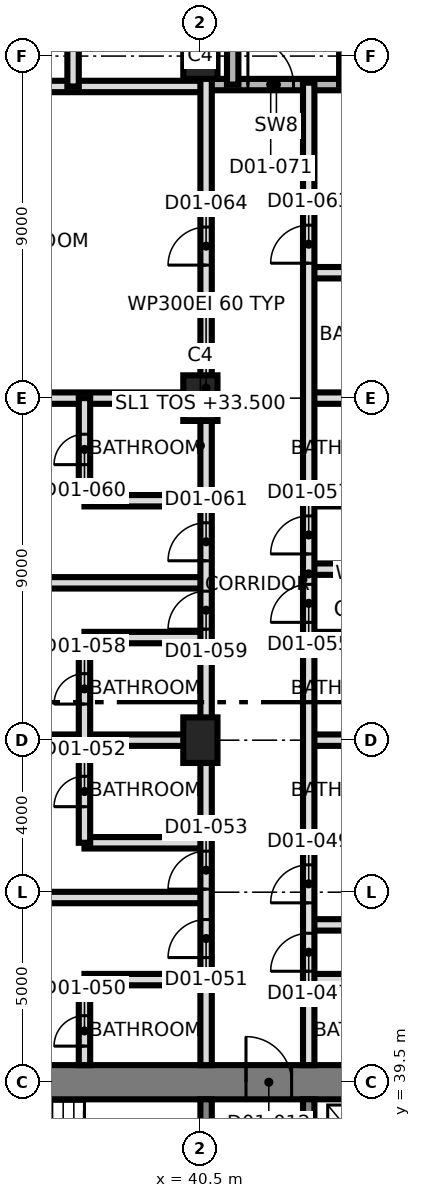
"""IFC4 building model, lengths in metres.
Left out: names, types, materials, properties, quantities, classifications, styles, units other than length and angle.
Written with IfcOpenShell. Run it as: python <this file> out.ifc"""

import sys

from ifc_helpers import new_model, si_unit, direction, frame, frame_2d, origin, origin_2d, place, context, subcontext, project, spatial, rectangle, extrude, element, fill, save


model = new_model("IFC4")
c1 = context("Model", 3, precision=1e-05, world=origin(), true_north=direction((0.0, 1.0)))
c2 = subcontext(c1, "Body", "Model", "MODEL_VIEW")
j1 = project(units=[si_unit("LENGTHUNIT", "METRE"), si_unit("PLANEANGLEUNIT", "RADIAN")], contexts=[c1])
p1 = place(None, origin())
s1 = spatial("IfcSite", under=j1, at=p1, CompositionType="ELEMENT")
p2 = place(p1, origin())
s2 = spatial("IfcBuilding", under=s1, at=p2, CompositionType="ELEMENT")
p3 = place(p2, frame((0.0, 0.0, 33.5)))
s3 = spatial("IfcBuildingStorey", under=s2, at=p3, CompositionType="ELEMENT", Elevation=33.5)
p4 = place(p3, frame((31.05, 39.5, 0.0), z_axis=(0.0, 0.0, 1.0), x_axis=(1.0, 0.0, 0.0)))
e1 = element("IfcWall", 1, at=p4, inside=s3, PredefinedType="SHEAR", context=c2, shape_type="SweptSolid", body=[
    extrude(rectangle(XDim=27.0, YDim=0.9, at=frame_2d((13.5, 0.0))), origin(), (0.0, 0.0, 1.0), 3.7),
])
p5 = place(p4, frame((10.65, 0.0, 0.0)))
e2 = element("IfcOpeningElement", 2, at=p5, cuts=e1, PredefinedType="OPENING", context=c2, shape_type="SweptSolid", body=[
    extrude(rectangle(XDim=1.2, YDim=2.1, at=frame_2d((0.6, 1.05))), frame((0.0, 0.46, 0.0), z_axis=(0.0, -1.0, 0.0), x_axis=(1.0, 0.0, 0.0)), (0.0, 0.0, 1.0), 0.92),
])
for number, where, z_axis, x_axis in (
    (3, (40.65, 33.5, 0.0), (0.0, 0.0, 1.0), (0.0, 1.0, 0.0)),
    (4, (43.35, 33.5, 0.0), (0.0, 0.0, 1.0), (0.0, 1.0, 0.0)),
):
    element("IfcWall", number, at=place(p3, frame(where, z_axis=z_axis, x_axis=x_axis)), inside=s3, PredefinedType="SHEAR", context=c2, shape_type="SweptSolid", body=[
        extrude(rectangle(XDim=5.55, YDim=0.3, at=frame_2d((2.775, 0.0))), origin(), (0.0, 0.0, 1.0), 3.7),
    ])
for number, where, z_axis, x_axis in (
    (5, (40.5, 48.5, 0.0), (0.0, 0.0, 1.0), (0.0, 1.0, 0.0)),
    (6, (40.5, 57.5, 0.0), (0.0, 0.0, 1.0), (0.0, 1.0, 0.0)),
    (7, (40.5, 66.5, 0.0), (0.0, 0.0, 1.0), (0.0, 1.0, 0.0)),
):
    element("IfcColumn", number, at=place(p3, frame(where, z_axis=z_axis, x_axis=x_axis)), inside=s3, PredefinedType="COLUMN", context=c2, shape_type="SweptSolid", body=[
        extrude(rectangle(XDim=1.2, YDim=0.9, at=origin_2d()), origin(), (0.0, 0.0, 1.0), 3.7),
    ])
for number, where, z_axis, x_axis in (
    (8, (37.45, 42.2, 0.0), (0.0, 0.0, 1.0), (1.0, 0.0, 0.0)),
    (9, (43.35, 42.2, 0.0), (0.0, 0.0, 1.0), (1.0, 0.0, 0.0)),
):
    element("IfcWall", number, at=place(p3, frame(where, z_axis=z_axis, x_axis=x_axis)), inside=s3, PredefinedType="PARTITIONING", context=c2, shape_type="SweptSolid", body=[
        extrude(rectangle(XDim=3.2, YDim=0.3, at=frame_2d((1.6, 0.0))), origin(), (0.0, 0.0, 1.0), 3.4),
    ])
p6 = place(p3, frame((43.35, 43.64, 0.0), z_axis=(0.0, 0.0, 1.0), x_axis=(1.0, 0.0, 0.0)))
e10 = element("IfcWall", 10, at=p6, inside=s3, PredefinedType="PARTITIONING", context=c2, shape_type="SweptSolid", body=[
    extrude(rectangle(XDim=6.796, YDim=0.3, at=frame_2d((3.398, 0.0))), origin(), (0.0, 0.0, 1.0), 3.4),
])
p7 = place(p3, frame((31.425, 44.36, 0.0), z_axis=(0.0, 0.0, 1.0), x_axis=(1.0, 0.0, 0.0)))
e11 = element("IfcWall", 11, at=p7, inside=s3, PredefinedType="PARTITIONING", context=c2, shape_type="SweptSolid", body=[
    extrude(rectangle(XDim=9.225, YDim=0.3, at=frame_2d((4.612, 0.0))), origin(), (0.0, 0.0, 1.0), 3.4),
])
for number, where, z_axis, x_axis in (
    (12, (37.45, 45.8, 0.0), (0.0, 0.0, 1.0), (1.0, 0.0, 0.0)),
    (13, (43.35, 45.8, 0.0), (0.0, 0.0, 1.0), (1.0, 0.0, 0.0)),
):
    element("IfcWall", number, at=place(p3, frame(where, z_axis=z_axis, x_axis=x_axis)), inside=s3, PredefinedType="PARTITIONING", context=c2, shape_type="SweptSolid", body=[
        extrude(rectangle(XDim=3.2, YDim=0.3, at=frame_2d((1.6, 0.0))), origin(), (0.0, 0.0, 1.0), 3.4),
    ])
p8 = place(p3, frame((31.425, 48.5, 0.0), z_axis=(0.0, 0.0, 1.0), x_axis=(1.0, 0.0, 0.0)))
e14 = element("IfcWall", 14, at=p8, inside=s3, PredefinedType="PARTITIONING", context=c2, shape_type="SweptSolid", body=[
    extrude(rectangle(XDim=9.225, YDim=0.3, at=frame_2d((4.612, 0.0))), origin(), (0.0, 0.0, 1.0), 3.4),
])
p9 = place(p3, frame((43.35, 48.5, 0.0), z_axis=(0.0, 0.0, 1.0), x_axis=(1.0, 0.0, 0.0)))
e15 = element("IfcWall", 15, at=p9, inside=s3, PredefinedType="PARTITIONING", context=c2, shape_type="SweptSolid", body=[
    extrude(rectangle(XDim=6.225, YDim=0.3, at=frame_2d((3.112, 0.0))), origin(), (0.0, 0.0, 1.0), 3.4),
])
for number, where, z_axis, x_axis in (
    (16, (37.45, 51.2, 0.0), (0.0, 0.0, 1.0), (1.0, 0.0, 0.0)),
    (17, (43.35, 51.2, 0.0), (0.0, 0.0, 1.0), (1.0, 0.0, 0.0)),
):
    element("IfcWall", number, at=place(p3, frame(where, z_axis=z_axis, x_axis=x_axis)), inside=s3, PredefinedType="PARTITIONING", context=c2, shape_type="SweptSolid", body=[
        extrude(rectangle(XDim=3.2, YDim=0.3, at=frame_2d((1.6, 0.0))), origin(), (0.0, 0.0, 1.0), 3.4),
    ])
p10 = place(p3, frame((31.425, 52.64, 0.0), z_axis=(0.0, 0.0, 1.0), x_axis=(1.0, 0.0, 0.0)))
e18 = element("IfcWall", 18, at=p10, inside=s3, PredefinedType="PARTITIONING", context=c2, shape_type="SweptSolid", body=[
    extrude(rectangle(XDim=9.225, YDim=0.3, at=frame_2d((4.612, 0.0))), origin(), (0.0, 0.0, 1.0), 3.4),
])
p11 = place(p3, frame((43.35, 53.0, 0.0), z_axis=(0.0, 0.0, 1.0), x_axis=(1.0, 0.0, 0.0)))
e19 = element("IfcWall", 19, at=p11, inside=s3, PredefinedType="PARTITIONING", context=c2, shape_type="SweptSolid", body=[
    extrude(rectangle(XDim=6.405, YDim=0.3, at=frame_2d((3.202, 0.0))), origin(), (0.0, 0.0, 1.0), 3.4),
])
for number, where, z_axis, x_axis in (
    (20, (37.45, 54.8, 0.0), (0.0, 0.0, 1.0), (1.0, 0.0, 0.0)),
    (21, (43.35, 54.8, 0.0), (0.0, 0.0, 1.0), (1.0, 0.0, 0.0)),
):
    element("IfcWall", number, at=place(p3, frame(where, z_axis=z_axis, x_axis=x_axis)), inside=s3, PredefinedType="PARTITIONING", context=c2, shape_type="SweptSolid", body=[
        extrude(rectangle(XDim=3.2, YDim=0.3, at=frame_2d((1.6, 0.0))), origin(), (0.0, 0.0, 1.0), 3.4),
    ])
p12 = place(p3, frame((31.425, 57.5, 0.0), z_axis=(0.0, 0.0, 1.0), x_axis=(1.0, 0.0, 0.0)))
e22 = element("IfcWall", 22, at=p12, inside=s3, PredefinedType="PARTITIONING", context=c2, shape_type="SweptSolid", body=[
    extrude(rectangle(XDim=9.225, YDim=0.3, at=frame_2d((4.612, 0.0))), origin(), (0.0, 0.0, 1.0), 3.4),
])
p13 = place(p3, frame((43.35, 57.5, 0.0), z_axis=(0.0, 0.0, 1.0), x_axis=(1.0, 0.0, 0.0)))
e23 = element("IfcWall", 23, at=p13, inside=s3, PredefinedType="PARTITIONING", context=c2, shape_type="SweptSolid", body=[
    extrude(rectangle(XDim=6.225, YDim=0.3, at=frame_2d((3.112, 0.0))), origin(), (0.0, 0.0, 1.0), 3.4),
])
p14 = place(p3, frame((43.35, 60.8, 0.0), z_axis=(0.0, 0.0, 1.0), x_axis=(1.0, 0.0, 0.0)))
e24 = element("IfcWall", 24, at=p14, inside=s3, PredefinedType="PARTITIONING", context=c2, shape_type="SweptSolid", body=[
    extrude(rectangle(XDim=3.5, YDim=0.3, at=frame_2d((1.75, 0.0))), origin(), (0.0, 0.0, 1.0), 3.4),
])
p15 = place(p3, frame((31.425, 65.7, 0.0), z_axis=(0.0, 0.0, 1.0), x_axis=(1.0, 0.0, 0.0)))
e25 = element("IfcWall", 25, at=p15, inside=s3, PredefinedType="PARTITIONING", context=c2, shape_type="SweptSolid", body=[
    extrude(rectangle(XDim=9.225, YDim=0.3, at=frame_2d((4.612, 0.0))), origin(), (0.0, 0.0, 1.0), 3.4),
])
p16 = place(p15, frame((3.575, 0.0, 0.0)))
e26 = element("IfcOpeningElement", 26, at=p16, cuts=e25, PredefinedType="OPENING", context=c2, shape_type="SweptSolid", body=[
    extrude(rectangle(XDim=1.0, YDim=2.1, at=frame_2d((0.5, 1.05))), frame((0.0, 0.16, 0.0), z_axis=(0.0, -1.0, 0.0), x_axis=(1.0, 0.0, 0.0)), (0.0, 0.0, 1.0), 0.32),
])
p17 = place(p3, frame((40.65, 65.75, 0.0), z_axis=(0.0, 0.0, 1.0), x_axis=(1.0, 0.0, 0.0)))
e27 = element("IfcWall", 27, at=p17, inside=s3, PredefinedType="SHEAR", context=c2, shape_type="SweptSolid", body=[
    extrude(rectangle(XDim=3.7, YDim=0.3, at=frame_2d((1.85, 0.0))), origin(), (0.0, 0.0, 1.0), 3.4),
])
p18 = place(p17, frame((1.1, 0.0, 0.0)))
e28 = element("IfcOpeningElement", 28, at=p18, cuts=e27, PredefinedType="OPENING", context=c2, shape_type="SweptSolid", body=[
    extrude(rectangle(XDim=1.2, YDim=2.1, at=frame_2d((0.6, 1.05))), frame((0.0, 0.16, 0.0), z_axis=(0.0, -1.0, 0.0), x_axis=(1.0, 0.0, 0.0)), (0.0, 0.0, 1.0), 0.32),
])
p19 = place(p3, frame((37.15, 65.7, 0.0), z_axis=(0.0, 0.0, 1.0), x_axis=(0.0, 1.0, 0.0)))
e29 = element("IfcWall", 29, at=p19, inside=s3, PredefinedType="PARTITIONING", context=c2, shape_type="SweptSolid", body=[
    extrude(rectangle(XDim=3.3, YDim=0.3, at=frame_2d((1.65, 0.0))), origin(), (0.0, 0.0, 1.0), 3.4),
])
p20 = place(p19, frame((1.25, 0.0, 0.0)))
e30 = element("IfcOpeningElement", 30, at=p20, cuts=e29, PredefinedType="OPENING", context=c2, shape_type="SweptSolid", body=[
    extrude(rectangle(XDim=0.8, YDim=2.1, at=frame_2d((0.4, 1.05))), frame((0.0, 0.16, 0.0), z_axis=(0.0, -1.0, 0.0), x_axis=(1.0, 0.0, 0.0)), (0.0, 0.0, 1.0), 0.32),
])
p21 = place(p3, frame((37.45, 39.95, 0.0), z_axis=(0.0, 0.0, 1.0), x_axis=(0.0, 1.0, 0.0)))
e31 = element("IfcWall", 31, at=p21, inside=s3, PredefinedType="PARTITIONING", context=c2, shape_type="SweptSolid", body=[
    extrude(rectangle(XDim=2.25, YDim=0.3, at=frame_2d((1.125, 0.0))), origin(), (0.0, 0.0, 1.0), 3.4),
])
p22 = place(p21, frame((0.5, 0.0, 0.0)))
e32 = element("IfcOpeningElement", 32, at=p22, cuts=e31, PredefinedType="OPENING", context=c2, shape_type="SweptSolid", body=[
    extrude(rectangle(XDim=0.8, YDim=2.1, at=frame_2d((0.4, 1.05))), frame((0.0, 0.16, 0.0), z_axis=(0.0, -1.0, 0.0), x_axis=(1.0, 0.0, 0.0)), (0.0, 0.0, 1.0), 0.32),
])
p23 = place(p3, frame((37.45, 45.8, 0.0), z_axis=(0.0, 0.0, 1.0), x_axis=(0.0, 1.0, 0.0)))
e33 = element("IfcWall", 33, at=p23, inside=s3, PredefinedType="PARTITIONING", context=c2, shape_type="SweptSolid", body=[
    extrude(rectangle(XDim=5.4, YDim=0.3, at=frame_2d((2.7, 0.0))), origin(), (0.0, 0.0, 1.0), 3.4),
])
p24 = place(p23, frame((0.95, 0.0, 0.0)))
e34 = element("IfcOpeningElement", 34, at=p24, cuts=e33, PredefinedType="OPENING", context=c2, shape_type="SweptSolid", body=[
    extrude(rectangle(XDim=0.8, YDim=2.1, at=frame_2d((0.4, 1.05))), frame((0.0, 0.16, 0.0), z_axis=(0.0, -1.0, 0.0), x_axis=(1.0, 0.0, 0.0)), (0.0, 0.0, 1.0), 0.32),
])
p25 = place(p23, frame((3.65, 0.0, 0.0)))
e35 = element("IfcOpeningElement", 35, at=p25, cuts=e33, PredefinedType="OPENING", context=c2, shape_type="SweptSolid", body=[
    extrude(rectangle(XDim=0.8, YDim=2.1, at=frame_2d((0.4, 1.05))), frame((0.0, 0.16, 0.0), z_axis=(0.0, -1.0, 0.0), x_axis=(1.0, 0.0, 0.0)), (0.0, 0.0, 1.0), 0.32),
])
p26 = place(p3, frame((37.45, 54.8, 0.0), z_axis=(0.0, 0.0, 1.0), x_axis=(0.0, 1.0, 0.0)))
e36 = element("IfcWall", 36, at=p26, inside=s3, PredefinedType="PARTITIONING", context=c2, shape_type="SweptSolid", body=[
    extrude(rectangle(XDim=2.7, YDim=0.3, at=frame_2d((1.35, 0.0))), origin(), (0.0, 0.0, 1.0), 3.4),
])
p27 = place(p26, frame((0.95, 0.0, 0.0)))
e37 = element("IfcOpeningElement", 37, at=p27, cuts=e36, PredefinedType="OPENING", context=c2, shape_type="SweptSolid", body=[
    extrude(rectangle(XDim=0.8, YDim=2.1, at=frame_2d((0.4, 1.05))), frame((0.0, 0.16, 0.0), z_axis=(0.0, -1.0, 0.0), x_axis=(1.0, 0.0, 0.0)), (0.0, 0.0, 1.0), 0.32),
])
p28 = place(p3, frame((40.65, 39.95, 0.0), z_axis=(0.0, 0.0, 1.0), x_axis=(0.0, 1.0, 0.0)))
e38 = element("IfcWall", 38, at=p28, inside=s3, PredefinedType="PARTITIONING", context=c2, shape_type="SweptSolid", body=[
    extrude(rectangle(XDim=35.625, YDim=0.3, at=frame_2d((17.812, 0.0))), origin(), (0.0, 0.0, 1.0), 3.4),
])
p29 = place(p28, frame((2.83, 0.0, 0.0)))
e39 = element("IfcOpeningElement", 39, at=p29, cuts=e38, PredefinedType="OPENING", context=c2, shape_type="SweptSolid", body=[
    extrude(rectangle(XDim=1.0, YDim=2.1, at=frame_2d((0.5, 1.05))), frame((0.0, 0.16, 0.0), z_axis=(0.0, -1.0, 0.0), x_axis=(1.0, 0.0, 0.0)), (0.0, 0.0, 1.0), 0.32),
])
p30 = place(p28, frame((4.63, 0.0, 0.0)))
e40 = element("IfcOpeningElement", 40, at=p30, cuts=e38, PredefinedType="OPENING", context=c2, shape_type="SweptSolid", body=[
    extrude(rectangle(XDim=1.0, YDim=2.1, at=frame_2d((0.5, 1.05))), frame((0.0, 0.16, 0.0), z_axis=(0.0, -1.0, 0.0), x_axis=(1.0, 0.0, 0.0)), (0.0, 0.0, 1.0), 0.32),
])
p31 = place(p28, frame((11.47, 0.0, 0.0)))
e41 = element("IfcOpeningElement", 41, at=p31, cuts=e38, PredefinedType="OPENING", context=c2, shape_type="SweptSolid", body=[
    extrude(rectangle(XDim=1.0, YDim=2.1, at=frame_2d((0.5, 1.05))), frame((0.0, 0.16, 0.0), z_axis=(0.0, -1.0, 0.0), x_axis=(1.0, 0.0, 0.0)), (0.0, 0.0, 1.0), 0.32),
])
p32 = place(p28, frame((13.27, 0.0, 0.0)))
e42 = element("IfcOpeningElement", 42, at=p32, cuts=e38, PredefinedType="OPENING", context=c2, shape_type="SweptSolid", body=[
    extrude(rectangle(XDim=1.0, YDim=2.1, at=frame_2d((0.5, 1.05))), frame((0.0, 0.16, 0.0), z_axis=(0.0, -1.0, 0.0), x_axis=(1.0, 0.0, 0.0)), (0.0, 0.0, 1.0), 0.32),
])
p33 = place(p28, frame((21.05, 0.0, 0.0)))
e43 = element("IfcOpeningElement", 43, at=p33, cuts=e38, PredefinedType="OPENING", context=c2, shape_type="SweptSolid", body=[
    extrude(rectangle(XDim=1.0, YDim=2.4, at=frame_2d((0.5, 1.2))), frame((0.0, 0.16, 0.0), z_axis=(0.0, -1.0, 0.0), x_axis=(1.0, 0.0, 0.0)), (0.0, 0.0, 1.0), 0.32),
])
p34 = place(p3, frame((41.35, 65.75, 0.0), z_axis=(0.0, 0.0, 1.0), x_axis=(0.0, 1.0, 0.0)))
e44 = element("IfcWall", 44, at=p34, inside=s3, PredefinedType="SHEAR", context=c2, shape_type="SweptSolid", body=[
    extrude(rectangle(XDim=8.85, YDim=0.3, at=frame_2d((4.425, 0.0))), origin(), (0.0, 0.0, 1.0), 3.4),
])
p35 = place(p3, frame((43.35, 39.95, 0.0), z_axis=(0.0, 0.0, 1.0), x_axis=(0.0, 1.0, 0.0)))
e45 = element("IfcWall", 45, at=p35, inside=s3, PredefinedType="SOLIDWALL", context=c2, shape_type="SweptSolid", body=[
    extrude(rectangle(XDim=25.85, YDim=0.3, at=frame_2d((12.925, 0.0))), origin(), (0.0, 0.0, 1.0), 3.4),
])
p36 = place(p35, frame((2.47, 0.0, 0.0)))
e46 = element("IfcOpeningElement", 46, at=p36, cuts=e45, PredefinedType="OPENING", context=c2, shape_type="SweptSolid", body=[
    extrude(rectangle(XDim=1.0, YDim=2.1, at=frame_2d((0.5, 1.05))), frame((0.0, 0.16, 0.0), z_axis=(0.0, -1.0, 0.0), x_axis=(1.0, 0.0, 0.0)), (0.0, 0.0, 1.0), 0.32),
])
p37 = place(p35, frame((4.27, 0.0, 0.0)))
e47 = element("IfcOpeningElement", 47, at=p37, cuts=e45, PredefinedType="OPENING", context=c2, shape_type="SweptSolid", body=[
    extrude(rectangle(XDim=1.0, YDim=2.1, at=frame_2d((0.5, 1.05))), frame((0.0, 0.16, 0.0), z_axis=(0.0, -1.0, 0.0), x_axis=(1.0, 0.0, 0.0)), (0.0, 0.0, 1.0), 0.32),
])
p38 = place(p35, frame((11.65, 0.0, 0.0)))
e48 = element("IfcOpeningElement", 48, at=p38, cuts=e45, PredefinedType="OPENING", context=c2, shape_type="SweptSolid", body=[
    extrude(rectangle(XDim=1.0, YDim=2.1, at=frame_2d((0.5, 1.05))), frame((0.0, 0.16, 0.0), z_axis=(0.0, -1.0, 0.0), x_axis=(1.0, 0.0, 0.0)), (0.0, 0.0, 1.0), 0.32),
])
p39 = place(p35, frame((13.45, 0.0, 0.0)))
e49 = element("IfcOpeningElement", 49, at=p39, cuts=e45, PredefinedType="OPENING", context=c2, shape_type="SweptSolid", body=[
    extrude(rectangle(XDim=1.0, YDim=2.1, at=frame_2d((0.5, 1.05))), frame((0.0, 0.16, 0.0), z_axis=(0.0, -1.0, 0.0), x_axis=(1.0, 0.0, 0.0)), (0.0, 0.0, 1.0), 0.32),
])
p40 = place(p35, frame((21.1, 0.0, 0.0)))
e50 = element("IfcOpeningElement", 50, at=p40, cuts=e45, PredefinedType="OPENING", context=c2, shape_type="SweptSolid", body=[
    extrude(rectangle(XDim=1.0, YDim=2.4, at=frame_2d((0.5, 1.2))), frame((0.0, 0.16, 0.0), z_axis=(0.0, -1.0, 0.0), x_axis=(1.0, 0.0, 0.0)), (0.0, 0.0, 1.0), 0.32),
])
p41 = place(p3, frame((44.3, 65.75, 0.0), z_axis=(0.0, 0.0, 1.0), x_axis=(0.0, 1.0, 0.0)))
e51 = element("IfcWall", 51, at=p41, inside=s3, PredefinedType="SHEAR", context=c2, shape_type="SweptSolid", body=[
    extrude(rectangle(XDim=8.85, YDim=0.3, at=frame_2d((4.425, 0.0))), origin(), (0.0, 0.0, 1.0), 3.4),
])
p42 = place(p5, origin())
e52 = element("IfcDoor", 52, at=p42, inside=s3, OperationType="SINGLE_SWING_RIGHT", PredefinedType="DOOR", context=c2, shape_type="SweptSolid", body=[
    extrude(rectangle(XDim=1.2, YDim=2.1, at=frame_2d((0.6, 1.05))), frame((0.0, 0.025, 0.0), z_axis=(0.0, -1.0, 0.0), x_axis=(1.0, 0.0, 0.0)), (0.0, 0.0, 1.0), 0.05),
])
fill(e2, e52)
p43 = place(p36, origin())
e53 = element("IfcDoor", 53, at=p43, inside=s3, OperationType="SINGLE_SWING_LEFT", PredefinedType="DOOR", context=c2, shape_type="SweptSolid", body=[
    extrude(rectangle(XDim=1.0, YDim=2.1, at=frame_2d((0.5, 1.05))), frame((0.0, 0.025, 0.0), z_axis=(0.0, -1.0, 0.0), x_axis=(1.0, 0.0, 0.0)), (0.0, 0.0, 1.0), 0.05),
])
fill(e46, e53)
p44 = place(p37, origin())
e54 = element("IfcDoor", 54, at=p44, inside=s3, OperationType="SINGLE_SWING_LEFT", PredefinedType="DOOR", context=c2, shape_type="SweptSolid", body=[
    extrude(rectangle(XDim=1.0, YDim=2.1, at=frame_2d((0.5, 1.05))), frame((0.0, 0.025, 0.0), z_axis=(0.0, -1.0, 0.0), x_axis=(1.0, 0.0, 0.0)), (0.0, 0.0, 1.0), 0.05),
])
fill(e47, e54)
p45 = place(p22, origin())
e55 = element("IfcDoor", 55, at=p45, inside=s3, OperationType="SINGLE_SWING_LEFT", PredefinedType="DOOR", context=c2, shape_type="SweptSolid", body=[
    extrude(rectangle(XDim=0.8, YDim=2.1, at=frame_2d((0.4, 1.05))), frame((0.0, 0.025, 0.0), z_axis=(0.0, -1.0, 0.0), x_axis=(1.0, 0.0, 0.0)), (0.0, 0.0, 1.0), 0.05),
])
fill(e32, e55)
p46 = place(p29, origin())
e56 = element("IfcDoor", 56, at=p46, inside=s3, OperationType="SINGLE_SWING_RIGHT", PredefinedType="DOOR", context=c2, shape_type="SweptSolid", body=[
    extrude(rectangle(XDim=1.0, YDim=2.1, at=frame_2d((0.5, 1.05))), frame((0.0, 0.025, 0.0), z_axis=(0.0, -1.0, 0.0), x_axis=(1.0, 0.0, 0.0)), (0.0, 0.0, 1.0), 0.05),
])
fill(e39, e56)
p47 = place(p24, origin())
e57 = element("IfcDoor", 57, at=p47, inside=s3, OperationType="SINGLE_SWING_RIGHT", PredefinedType="DOOR", context=c2, shape_type="SweptSolid", body=[
    extrude(rectangle(XDim=0.8, YDim=2.1, at=frame_2d((0.4, 1.05))), frame((0.0, 0.025, 0.0), z_axis=(0.0, -1.0, 0.0), x_axis=(1.0, 0.0, 0.0)), (0.0, 0.0, 1.0), 0.05),
])
fill(e34, e57)
p48 = place(p30, origin())
e58 = element("IfcDoor", 58, at=p48, inside=s3, OperationType="SINGLE_SWING_LEFT", PredefinedType="DOOR", context=c2, shape_type="SweptSolid", body=[
    extrude(rectangle(XDim=1.0, YDim=2.1, at=frame_2d((0.5, 1.05))), frame((0.0, 0.025, 0.0), z_axis=(0.0, -1.0, 0.0), x_axis=(1.0, 0.0, 0.0)), (0.0, 0.0, 1.0), 0.05),
])
fill(e40, e58)
p49 = place(p38, origin())
e59 = element("IfcDoor", 59, at=p49, inside=s3, OperationType="SINGLE_SWING_LEFT", PredefinedType="DOOR", context=c2, shape_type="SweptSolid", body=[
    extrude(rectangle(XDim=1.0, YDim=2.1, at=frame_2d((0.5, 1.05))), frame((0.0, 0.025, 0.0), z_axis=(0.0, -1.0, 0.0), x_axis=(1.0, 0.0, 0.0)), (0.0, 0.0, 1.0), 0.05),
])
fill(e48, e59)
p50 = place(p39, origin())
e60 = element("IfcDoor", 60, at=p50, inside=s3, OperationType="SINGLE_SWING_RIGHT", PredefinedType="DOOR", context=c2, shape_type="SweptSolid", body=[
    extrude(rectangle(XDim=1.0, YDim=2.1, at=frame_2d((0.5, 1.05))), frame((0.0, 0.025, 0.0), z_axis=(0.0, -1.0, 0.0), x_axis=(1.0, 0.0, 0.0)), (0.0, 0.0, 1.0), 0.05),
])
fill(e49, e60)
p51 = place(p25, origin())
e61 = element("IfcDoor", 61, at=p51, inside=s3, OperationType="SINGLE_SWING_RIGHT", PredefinedType="DOOR", context=c2, shape_type="SweptSolid", body=[
    extrude(rectangle(XDim=0.8, YDim=2.1, at=frame_2d((0.4, 1.05))), frame((0.0, 0.025, 0.0), z_axis=(0.0, -1.0, 0.0), x_axis=(1.0, 0.0, 0.0)), (0.0, 0.0, 1.0), 0.05),
])
fill(e35, e61)
p52 = place(p31, origin())
e62 = element("IfcDoor", 62, at=p52, inside=s3, OperationType="SINGLE_SWING_LEFT", PredefinedType="DOOR", context=c2, shape_type="SweptSolid", body=[
    extrude(rectangle(XDim=1.0, YDim=2.1, at=frame_2d((0.5, 1.05))), frame((0.0, 0.025, 0.0), z_axis=(0.0, -1.0, 0.0), x_axis=(1.0, 0.0, 0.0)), (0.0, 0.0, 1.0), 0.05),
])
fill(e41, e62)
p53 = place(p27, origin())
e63 = element("IfcDoor", 63, at=p53, inside=s3, OperationType="SINGLE_SWING_LEFT", PredefinedType="DOOR", context=c2, shape_type="SweptSolid", body=[
    extrude(rectangle(XDim=0.8, YDim=2.1, at=frame_2d((0.4, 1.05))), frame((0.0, 0.025, 0.0), z_axis=(0.0, -1.0, 0.0), x_axis=(1.0, 0.0, 0.0)), (0.0, 0.0, 1.0), 0.05),
])
fill(e37, e63)
p54 = place(p32, origin())
e64 = element("IfcDoor", 64, at=p54, inside=s3, OperationType="SINGLE_SWING_LEFT", PredefinedType="DOOR", context=c2, shape_type="SweptSolid", body=[
    extrude(rectangle(XDim=1.0, YDim=2.1, at=frame_2d((0.5, 1.05))), frame((0.0, 0.025, 0.0), z_axis=(0.0, -1.0, 0.0), x_axis=(1.0, 0.0, 0.0)), (0.0, 0.0, 1.0), 0.05),
])
fill(e42, e64)
p55 = place(p40, origin())
e65 = element("IfcDoor", 65, at=p55, inside=s3, OperationType="SINGLE_SWING_RIGHT", PredefinedType="DOOR", context=c2, shape_type="SweptSolid", body=[
    extrude(rectangle(XDim=1.0, YDim=2.4, at=frame_2d((0.5, 1.2))), frame((0.0, 0.025, 0.0), z_axis=(0.0, -1.0, 0.0), x_axis=(1.0, 0.0, 0.0)), (0.0, 0.0, 1.0), 0.05),
])
fill(e50, e65)
p56 = place(p33, origin())
e66 = element("IfcDoor", 66, at=p56, inside=s3, OperationType="SINGLE_SWING_LEFT", PredefinedType="DOOR", context=c2, shape_type="SweptSolid", body=[
    extrude(rectangle(XDim=1.0, YDim=2.4, at=frame_2d((0.5, 1.2))), frame((0.0, 0.025, 0.0), z_axis=(0.0, -1.0, 0.0), x_axis=(1.0, 0.0, 0.0)), (0.0, 0.0, 1.0), 0.05),
])
fill(e43, e66)
p57 = place(p18, origin())
e67 = element("IfcDoor", 67, at=p57, inside=s3, OperationType="SINGLE_SWING_RIGHT", PredefinedType="DOOR", context=c2, shape_type="SweptSolid", body=[
    extrude(rectangle(XDim=1.2, YDim=2.1, at=frame_2d((0.6, 1.05))), frame((0.0, 0.025, 0.0), z_axis=(0.0, -1.0, 0.0), x_axis=(1.0, 0.0, 0.0)), (0.0, 0.0, 1.0), 0.05),
])
fill(e28, e67)
save(model, sys.argv[1])
